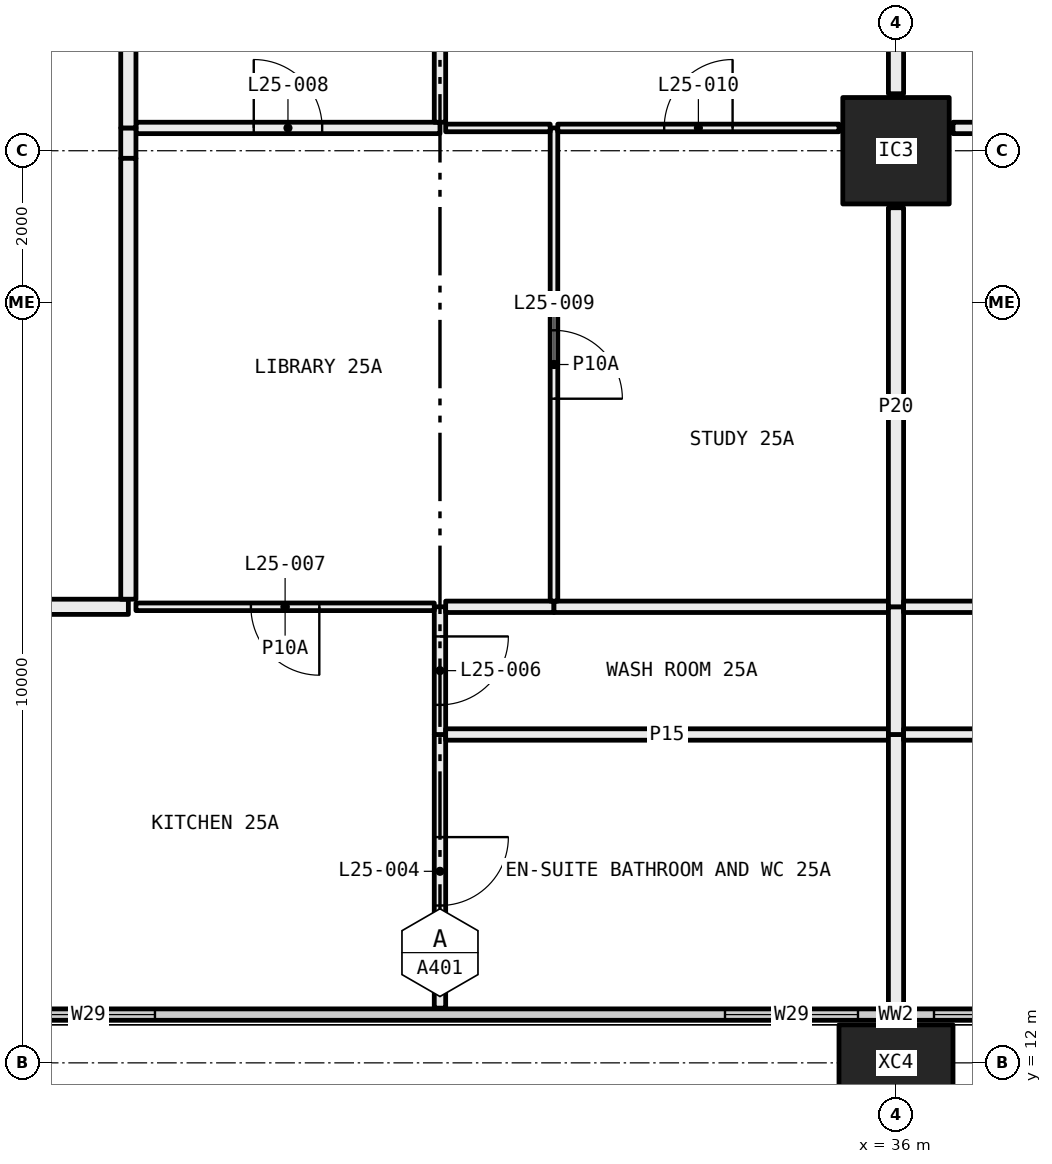
"""IFC4 building model, lengths in metres.
Left out: names, types, materials, properties, quantities, classifications, styles, units other than length and angle.
Written with IfcOpenShell. Run it as: python <this file> out.ifc"""

import sys

from ifc_helpers import new_model, si_unit, direction, frame, frame_2d, origin, origin_2d, place, context, subcontext, project, spatial, rectangle, hollow_rectangle, extrude, element, fill, save


model = new_model("IFC4")
c1 = context("Model", 3, precision=1e-05, world=origin(), true_north=direction((0.0, 1.0)))
c2 = subcontext(c1, "Body", "Model", "MODEL_VIEW")
j1 = project(units=[si_unit("LENGTHUNIT", "METRE"), si_unit("PLANEANGLEUNIT", "RADIAN")], contexts=[c1])
p1 = place(None, origin())
s1 = spatial("IfcSite", under=j1, at=p1, CompositionType="ELEMENT")
p2 = place(p1, origin())
s2 = spatial("IfcBuilding", under=s1, at=p2, CompositionType="ELEMENT")
p3 = place(p2, frame((0.0, 0.0, 100.05)))
s3 = spatial("IfcBuildingStorey", under=s2, at=p3, CompositionType="ELEMENT", Elevation=100.05)
p4 = place(p3, frame((36.0, 12.0, -0.4), z_axis=(0.0, 0.0, 1.0), x_axis=(1.0, 0.0, 0.0)))
e1 = element("IfcColumn", 1, at=p4, inside=s3, PredefinedType="COLUMN", context=c2, shape_type="SweptSolid", body=[
    extrude(hollow_rectangle(XDim=1.5, YDim=1.0, WallThickness=0.06, at=origin_2d()), origin(), (0.0, 0.0, 1.0), 3.45),
])
p5 = place(p3, frame((36.0, 24.0, 0.0), z_axis=(0.0, 0.0, 1.0), x_axis=(1.0, 0.0, 0.0)))
e2 = element("IfcColumn", 2, at=p5, inside=s3, PredefinedType="COLUMN", context=c2, shape_type="SweptSolid", body=[
    extrude(hollow_rectangle(XDim=1.4, YDim=1.4, WallThickness=0.06, at=origin_2d()), origin(), (0.0, 0.0, 1.0), 3.05),
])
p6 = place(p3, frame((6.56, 12.635, 0.0), z_axis=(0.0, 0.0, 1.0), x_axis=(1.0, 0.0, 0.0)))
e3 = element("IfcWall", 3, at=p6, inside=s3, PredefinedType="ELEMENTEDWALL", context=c2, shape_type="SweptSolid", body=[
    extrude(rectangle(XDim=58.88, YDim=0.15, at=frame_2d((29.44, 0.0))), origin(), (0.0, 0.0, 1.0), 3.05),
])
p7 = place(p6, frame((0.44, 0.0, 0.45)))
e4 = element("IfcOpeningElement", 4, at=p7, cuts=e3, PredefinedType="OPENING", context=c2, shape_type="SweptSolid", body=[
    extrude(rectangle(XDim=4.5, YDim=2.55, at=frame_2d((2.25, 1.275))), frame((0.0, 0.085, 0.0), z_axis=(0.0, -1.0, 0.0), x_axis=(1.0, 0.0, 0.0)), (0.0, 0.0, 1.0), 0.17),
])
p8 = place(p6, frame((5.94, 0.0, 0.45)))
e5 = element("IfcOpeningElement", 5, at=p8, cuts=e3, PredefinedType="OPENING", context=c2, shape_type="SweptSolid", body=[
    extrude(rectangle(XDim=1.75, YDim=2.55, at=frame_2d((0.875, 1.275))), frame((0.0, 0.085, 0.0), z_axis=(0.0, -1.0, 0.0), x_axis=(1.0, 0.0, 0.0)), (0.0, 0.0, 1.0), 0.17),
])
p9 = place(p6, frame((15.19, 0.0, 0.45)))
e6 = element("IfcOpeningElement", 6, at=p9, cuts=e3, PredefinedType="OPENING", context=c2, shape_type="SweptSolid", body=[
    extrude(rectangle(XDim=1.75, YDim=2.55, at=frame_2d((0.875, 1.275))), frame((0.0, 0.085, 0.0), z_axis=(0.0, -1.0, 0.0), x_axis=(1.0, 0.0, 0.0)), (0.0, 0.0, 1.0), 0.17),
])
p10 = place(p6, frame((17.94, 0.0, 0.45)))
e7 = element("IfcOpeningElement", 7, at=p10, cuts=e3, PredefinedType="OPENING", context=c2, shape_type="SweptSolid", body=[
    extrude(rectangle(XDim=1.75, YDim=2.55, at=frame_2d((0.875, 1.275))), frame((0.0, 0.085, 0.0), z_axis=(0.0, -1.0, 0.0), x_axis=(1.0, 0.0, 0.0)), (0.0, 0.0, 1.0), 0.17),
])
p11 = place(p6, frame((27.19, 0.0, 0.45)))
e8 = element("IfcOpeningElement", 8, at=p11, cuts=e3, PredefinedType="OPENING", context=c2, shape_type="SweptSolid", body=[
    extrude(rectangle(XDim=1.75, YDim=2.55, at=frame_2d((0.875, 1.275))), frame((0.0, 0.085, 0.0), z_axis=(0.0, -1.0, 0.0), x_axis=(1.0, 0.0, 0.0)), (0.0, 0.0, 1.0), 0.17),
])
p12 = place(p6, frame((29.94, 0.0, 0.45)))
e9 = element("IfcOpeningElement", 9, at=p12, cuts=e3, PredefinedType="OPENING", context=c2, shape_type="SweptSolid", body=[
    extrude(rectangle(XDim=1.75, YDim=2.55, at=frame_2d((0.875, 1.275))), frame((0.0, 0.085, 0.0), z_axis=(0.0, -1.0, 0.0), x_axis=(1.0, 0.0, 0.0)), (0.0, 0.0, 1.0), 0.17),
])
p13 = place(p6, frame((39.19, 0.0, 0.45)))
e10 = element("IfcOpeningElement", 10, at=p13, cuts=e3, PredefinedType="OPENING", context=c2, shape_type="SweptSolid", body=[
    extrude(rectangle(XDim=1.75, YDim=2.55, at=frame_2d((0.875, 1.275))), frame((0.0, 0.085, 0.0), z_axis=(0.0, -1.0, 0.0), x_axis=(1.0, 0.0, 0.0)), (0.0, 0.0, 1.0), 0.17),
])
p14 = place(p6, frame((41.94, 0.0, 0.45)))
e11 = element("IfcOpeningElement", 11, at=p14, cuts=e3, PredefinedType="OPENING", context=c2, shape_type="SweptSolid", body=[
    extrude(rectangle(XDim=1.75, YDim=2.55, at=frame_2d((0.875, 1.275))), frame((0.0, 0.085, 0.0), z_axis=(0.0, -1.0, 0.0), x_axis=(1.0, 0.0, 0.0)), (0.0, 0.0, 1.0), 0.17),
])
p15 = place(p6, frame((51.19, 0.0, 0.45)))
e12 = element("IfcOpeningElement", 12, at=p15, cuts=e3, PredefinedType="OPENING", context=c2, shape_type="SweptSolid", body=[
    extrude(rectangle(XDim=1.75, YDim=2.55, at=frame_2d((0.875, 1.275))), frame((0.0, 0.085, 0.0), z_axis=(0.0, -1.0, 0.0), x_axis=(1.0, 0.0, 0.0)), (0.0, 0.0, 1.0), 0.17),
])
p16 = place(p6, frame((53.94, 0.0, 0.45)))
e13 = element("IfcOpeningElement", 13, at=p16, cuts=e3, PredefinedType="OPENING", context=c2, shape_type="SweptSolid", body=[
    extrude(rectangle(XDim=4.5, YDim=2.55, at=frame_2d((2.25, 1.275))), frame((0.0, 0.085, 0.0), z_axis=(0.0, -1.0, 0.0), x_axis=(1.0, 0.0, 0.0)), (0.0, 0.0, 1.0), 0.17),
])
p17 = place(p3, frame((30.0, 12.72, 0.0), z_axis=(0.0, 0.0, 1.0), x_axis=(0.0, 1.0, 0.0)))
e14 = element("IfcWall", 14, at=p17, inside=s3, PredefinedType="PARTITIONING", context=c2, shape_type="SweptSolid", body=[
    extrude(rectangle(XDim=3.6, YDim=0.15, at=frame_2d((1.8, 0.0))), origin(), (0.0, 0.0, 1.0), 3.05),
])
p18 = place(p17, frame((1.35, 0.0, 0.0)))
e15 = element("IfcOpeningElement", 15, at=p18, cuts=e14, PredefinedType="OPENING", context=c2, shape_type="SweptSolid", body=[
    extrude(rectangle(XDim=0.9, YDim=2.1, at=frame_2d((0.45, 1.05))), frame((0.0, 0.085, 0.0), z_axis=(0.0, -1.0, 0.0), x_axis=(1.0, 0.0, 0.0)), (0.0, 0.0, 1.0), 0.17),
])
p19 = place(p3, frame((30.0, 16.32, 0.0), z_axis=(0.0, 0.0, 1.0), x_axis=(0.0, 1.0, 0.0)))
e16 = element("IfcWall", 16, at=p19, inside=s3, PredefinedType="PARTITIONING", context=c2, shape_type="SweptSolid", body=[
    extrude(rectangle(XDim=1.68, YDim=0.15, at=frame_2d((0.84, 0.0))), origin(), (0.0, 0.0, 1.0), 3.05),
])
p20 = place(p19, frame((0.39, 0.0, 0.0)))
e17 = element("IfcOpeningElement", 17, at=p20, cuts=e16, PredefinedType="OPENING", context=c2, shape_type="SweptSolid", body=[
    extrude(rectangle(XDim=0.9, YDim=2.1, at=frame_2d((0.45, 1.05))), frame((0.0, 0.085, 0.0), z_axis=(0.0, -1.0, 0.0), x_axis=(1.0, 0.0, 0.0)), (0.0, 0.0, 1.0), 0.17),
])
p21 = place(p3, frame((29.925, 18.0, 0.0), z_axis=(0.0, 0.0, 1.0), x_axis=(-1.0, 0.0, 0.0)))
e18 = element("IfcWall", 18, at=p21, inside=s3, PredefinedType="PARTITIONING", context=c2, shape_type="SweptSolid", body=[
    extrude(rectangle(XDim=3.925, YDim=0.1, at=frame_2d((1.962, 0.0))), origin(), (0.0, 0.0, 1.0), 3.05),
])
p22 = place(p21, frame((1.512, 0.0, 0.0)))
e19 = element("IfcOpeningElement", 19, at=p22, cuts=e18, PredefinedType="OPENING", context=c2, shape_type="SweptSolid", body=[
    extrude(rectangle(XDim=0.9, YDim=2.1, at=frame_2d((0.45, 1.05))), frame((0.0, 0.06, 0.0), z_axis=(0.0, -1.0, 0.0), x_axis=(1.0, 0.0, 0.0)), (0.0, 0.0, 1.0), 0.12),
])
p23 = place(p3, frame((25.9, 18.0, 0.0), z_axis=(0.0, 0.0, 1.0), x_axis=(-1.0, 0.0, 0.0)))
e20 = element("IfcWall", 20, at=p23, inside=s3, PredefinedType="PARTITIONING", context=c2, shape_type="SweptSolid", body=[
    extrude(rectangle(XDim=1.9, YDim=0.2, at=frame_2d((0.95, 0.0))), origin(), (0.0, 0.0, 1.0), 3.05),
])
p24 = place(p3, frame((35.9, 16.32, 0.0), z_axis=(0.0, 0.0, 1.0), x_axis=(-1.0, 0.0, 0.0)))
e21 = element("IfcWall", 21, at=p24, inside=s3, PredefinedType="PARTITIONING", context=c2, shape_type="SweptSolid", body=[
    extrude(rectangle(XDim=5.825, YDim=0.15, at=frame_2d((2.913, 0.0))), origin(), (0.0, 0.0, 1.0), 3.05),
])
p25 = place(p3, frame((36.0, 12.72, 0.0), z_axis=(0.0, 0.0, 1.0), x_axis=(0.0, 1.0, 0.0)))
e22 = element("IfcWall", 22, at=p25, inside=s3, PredefinedType="PARTITIONING", context=c2, shape_type="SweptSolid", body=[
    extrude(rectangle(XDim=3.6, YDim=0.2, at=frame_2d((1.8, 0.0))), origin(), (0.0, 0.0, 1.0), 2.45),
])
p26 = place(p3, frame((31.5, 18.0, 0.0), z_axis=(0.0, 0.0, 1.0), x_axis=(-1.0, 0.0, 0.0)))
e23 = element("IfcWall", 23, at=p26, inside=s3, PredefinedType="PARTITIONING", context=c2, shape_type="SweptSolid", body=[
    extrude(rectangle(XDim=1.425, YDim=0.15, at=frame_2d((0.712, 0.0))), origin(), (0.0, 0.0, 1.0), 3.05),
])
p27 = place(p3, frame((35.9, 18.0, 0.0), z_axis=(0.0, 0.0, 1.0), x_axis=(-1.0, 0.0, 0.0)))
e24 = element("IfcWall", 24, at=p27, inside=s3, PredefinedType="PARTITIONING", context=c2, shape_type="SweptSolid", body=[
    extrude(rectangle(XDim=4.4, YDim=0.15, at=frame_2d((2.2, 0.0))), origin(), (0.0, 0.0, 1.0), 3.05),
])
p28 = place(p3, frame((36.0, 16.32, 0.0), z_axis=(0.0, 0.0, 1.0), x_axis=(0.0, 1.0, 0.0)))
e25 = element("IfcWall", 25, at=p28, inside=s3, PredefinedType="PARTITIONING", context=c2, shape_type="SweptSolid", body=[
    extrude(rectangle(XDim=1.68, YDim=0.2, at=frame_2d((0.84, 0.0))), origin(), (0.0, 0.0, 1.0), 2.45),
])
p29 = place(p3, frame((31.5, 18.075, 0.0), z_axis=(0.0, 0.0, 1.0), x_axis=(0.0, 1.0, 0.0)))
e26 = element("IfcWall", 26, at=p29, inside=s3, PredefinedType="PARTITIONING", context=c2, shape_type="SweptSolid", body=[
    extrude(rectangle(XDim=6.225, YDim=0.1, at=frame_2d((3.113, 0.0))), origin(), (0.0, 0.0, 1.0), 2.45),
])
p30 = place(p29, frame((2.663, 0.0, 0.0)))
e27 = element("IfcOpeningElement", 27, at=p30, cuts=e26, PredefinedType="OPENING", context=c2, shape_type="SweptSolid", body=[
    extrude(rectangle(XDim=0.9, YDim=2.1, at=frame_2d((0.45, 1.05))), frame((0.0, 0.06, 0.0), z_axis=(0.0, -1.0, 0.0), x_axis=(1.0, 0.0, 0.0)), (0.0, 0.0, 1.0), 0.12),
])
p31 = place(p3, frame((30.0, 24.3, 0.0), z_axis=(0.0, 0.0, 1.0), x_axis=(-1.0, 0.0, 0.0)))
e28 = element("IfcWall", 28, at=p31, inside=s3, PredefinedType="PARTITIONING", context=c2, shape_type="SweptSolid", body=[
    extrude(rectangle(XDim=4.0, YDim=0.15, at=frame_2d((2.0, 0.0))), origin(), (0.0, 0.0, 1.0), 3.05),
])
p32 = place(p31, frame((1.55, 0.0, 0.0)))
e29 = element("IfcOpeningElement", 29, at=p32, cuts=e28, PredefinedType="OPENING", context=c2, shape_type="SweptSolid", body=[
    extrude(rectangle(XDim=0.9, YDim=2.1, at=frame_2d((0.45, 1.05))), frame((0.0, 0.085, 0.0), z_axis=(0.0, -1.0, 0.0), x_axis=(1.0, 0.0, 0.0)), (0.0, 0.0, 1.0), 0.17),
])
p33 = place(p3, frame((31.45, 24.3, 0.0), z_axis=(0.0, 0.0, 1.0), x_axis=(-1.0, 0.0, 0.0)))
e30 = element("IfcWall", 30, at=p33, inside=s3, PredefinedType="PARTITIONING", context=c2, shape_type="SweptSolid", body=[
    extrude(rectangle(XDim=1.375, YDim=0.1, at=frame_2d((0.688, 0.0))), origin(), (0.0, 0.0, 1.0), 3.05),
])
p34 = place(p3, frame((25.9, 24.3, 0.0), z_axis=(0.0, 0.0, 1.0), x_axis=(0.0, -1.0, 0.0)))
e31 = element("IfcWall", 31, at=p34, inside=s3, PredefinedType="PARTITIONING", context=c2, shape_type="SweptSolid", body=[
    extrude(rectangle(XDim=0.4, YDim=0.2, at=frame_2d((0.2, 0.0))), origin(), (0.0, 0.0, 1.0), 2.45),
])
p35 = place(p3, frame((25.9, 23.9, 0.0), z_axis=(0.0, 0.0, 1.0), x_axis=(0.0, -1.0, 0.0)))
e32 = element("IfcWall", 32, at=p35, inside=s3, PredefinedType="PARTITIONING", context=c2, shape_type="SweptSolid", body=[
    extrude(rectangle(XDim=5.8, YDim=0.2, at=frame_2d((2.9, 0.0))), origin(), (0.0, 0.0, 1.0), 3.05),
])
p36 = place(p3, frame((35.25, 24.3, 0.0), z_axis=(0.0, 0.0, 1.0), x_axis=(-1.0, 0.0, 0.0)))
e33 = element("IfcWall", 33, at=p36, inside=s3, PredefinedType="PARTITIONING", context=c2, shape_type="SweptSolid", body=[
    extrude(rectangle(XDim=3.7, YDim=0.1, at=frame_2d((1.85, 0.0))), origin(), (0.0, 0.0, 1.0), 3.05),
])
p37 = place(p36, frame((1.4, 0.0, 0.0)))
e34 = element("IfcOpeningElement", 34, at=p37, cuts=e33, PredefinedType="OPENING", context=c2, shape_type="SweptSolid", body=[
    extrude(rectangle(XDim=0.9, YDim=2.1, at=frame_2d((0.45, 1.05))), frame((0.0, 0.06, 0.0), z_axis=(0.0, -1.0, 0.0), x_axis=(1.0, 0.0, 0.0)), (0.0, 0.0, 1.0), 0.12),
])
p38 = place(p3, frame((36.0, 18.0, 0.0), z_axis=(0.0, 0.0, 1.0), x_axis=(0.0, 1.0, 0.0)))
e35 = element("IfcWall", 35, at=p38, inside=s3, PredefinedType="PARTITIONING", context=c2, shape_type="SweptSolid", body=[
    extrude(rectangle(XDim=5.25, YDim=0.2, at=frame_2d((2.625, 0.0))), origin(), (0.0, 0.0, 1.0), 2.45),
])
p39 = place(p3, frame((30.0, 24.375, 0.0), z_axis=(0.0, 0.0, 1.0), x_axis=(0.0, 1.0, 0.0)))
e36 = element("IfcWall", 36, at=p39, inside=s3, PredefinedType="PARTITIONING", context=c2, shape_type="SweptSolid", body=[
    extrude(rectangle(XDim=4.325, YDim=0.15, at=frame_2d((2.163, 0.0))), origin(), (0.0, 0.0, 1.0), 3.05),
])
p40 = place(p3, frame((25.9, 28.7, 0.0), z_axis=(0.0, 0.0, 1.0), x_axis=(0.0, -1.0, 0.0)))
e37 = element("IfcWall", 37, at=p40, inside=s3, PredefinedType="PARTITIONING", context=c2, shape_type="SweptSolid", body=[
    extrude(rectangle(XDim=4.4, YDim=0.2, at=frame_2d((2.2, 0.0))), origin(), (0.0, 0.0, 1.0), 3.05),
])
p41 = place(p3, frame((36.0, 24.75, 0.0), z_axis=(0.0, 0.0, 1.0), x_axis=(0.0, 1.0, 0.0)))
e38 = element("IfcWall", 38, at=p41, inside=s3, PredefinedType="PARTITIONING", context=c2, shape_type="SweptSolid", body=[
    extrude(rectangle(XDim=1.8, YDim=0.2, at=frame_2d((0.9, 0.0))), origin(), (0.0, 0.0, 1.0), 2.45),
])
p42 = place(p3, frame((42.0, 16.32, 0.0), z_axis=(0.0, 0.0, 1.0), x_axis=(-1.0, 0.0, 0.0)))
e39 = element("IfcWall", 39, at=p42, inside=s3, PredefinedType="PARTITIONING", context=c2, shape_type="SweptSolid", body=[
    extrude(rectangle(XDim=5.9, YDim=0.15, at=frame_2d((2.95, 0.0))), origin(), (0.0, 0.0, 1.0), 3.05),
])
p43 = place(p3, frame((40.5, 18.0, 0.0), z_axis=(0.0, 0.0, 1.0), x_axis=(-1.0, 0.0, 0.0)))
e40 = element("IfcWall", 40, at=p43, inside=s3, PredefinedType="PARTITIONING", context=c2, shape_type="SweptSolid", body=[
    extrude(rectangle(XDim=4.4, YDim=0.15, at=frame_2d((2.2, 0.0))), origin(), (0.0, 0.0, 1.0), 3.05),
])
p44 = place(p3, frame((38.4, 24.3, 0.0), z_axis=(0.0, 0.0, 1.0), x_axis=(-1.0, 0.0, 0.0)))
e41 = element("IfcWall", 41, at=p44, inside=s3, PredefinedType="PARTITIONING", context=c2, shape_type="SweptSolid", body=[
    extrude(rectangle(XDim=1.65, YDim=0.15, at=frame_2d((0.825, 0.0))), origin(), (0.0, 0.0, 1.0), 3.05),
])
p45 = place(p44, frame((0.375, 0.0, 0.0)))
e42 = element("IfcOpeningElement", 42, at=p45, cuts=e41, PredefinedType="OPENING", context=c2, shape_type="SweptSolid", body=[
    extrude(rectangle(XDim=0.9, YDim=2.1, at=frame_2d((0.45, 1.05))), frame((0.0, 0.085, 0.0), z_axis=(0.0, -1.0, 0.0), x_axis=(1.0, 0.0, 0.0)), (0.0, 0.0, 1.0), 0.17),
])
p46 = place(p10, origin())
e43 = element("IfcWindow", 43, at=p46, inside=s3, PartitioningType="SINGLE_PANEL", PredefinedType="WINDOW", context=c2, shape_type="SweptSolid", body=[
    extrude(rectangle(XDim=1.75, YDim=2.55, at=frame_2d((0.875, 1.275))), frame((0.0, 0.03, 0.0), z_axis=(0.0, -1.0, 0.0), x_axis=(1.0, 0.0, 0.0)), (0.0, 0.0, 1.0), 0.06),
])
fill(e7, e43)
p47 = place(p11, origin())
e44 = element("IfcWindow", 44, at=p47, inside=s3, PartitioningType="SINGLE_PANEL", PredefinedType="WINDOW", context=c2, shape_type="SweptSolid", body=[
    extrude(rectangle(XDim=1.75, YDim=2.55, at=frame_2d((0.875, 1.275))), frame((0.0, 0.03, 0.0), z_axis=(0.0, -1.0, 0.0), x_axis=(1.0, 0.0, 0.0)), (0.0, 0.0, 1.0), 0.06),
])
fill(e8, e44)
p48 = place(p12, origin())
e45 = element("IfcWindow", 45, at=p48, inside=s3, PartitioningType="SINGLE_PANEL", PredefinedType="WINDOW", context=c2, shape_type="SweptSolid", body=[
    extrude(rectangle(XDim=1.75, YDim=2.55, at=frame_2d((0.875, 1.275))), frame((0.0, 0.03, 0.0), z_axis=(0.0, -1.0, 0.0), x_axis=(1.0, 0.0, 0.0)), (0.0, 0.0, 1.0), 0.06),
])
fill(e9, e45)
p49 = place(p18, frame((0.9, 0.0, 0.0), x_axis=(-1.0, 0.0, 0.0)))
e46 = element("IfcDoor", 46, at=p49, inside=s3, OperationType="SINGLE_SWING_RIGHT", PredefinedType="DOOR", context=c2, shape_type="SweptSolid", body=[
    extrude(rectangle(XDim=0.9, YDim=2.1, at=frame_2d((0.45, 1.05))), frame((0.0, 0.025, 0.0), z_axis=(0.0, -1.0, 0.0), x_axis=(1.0, 0.0, 0.0)), (0.0, 0.0, 1.0), 0.05),
])
fill(e15, e46)
p50 = place(p20, frame((0.9, 0.0, 0.0), x_axis=(-1.0, 0.0, 0.0)))
e47 = element("IfcDoor", 47, at=p50, inside=s3, OperationType="SINGLE_SWING_RIGHT", PredefinedType="DOOR", context=c2, shape_type="SweptSolid", body=[
    extrude(rectangle(XDim=0.9, YDim=2.1, at=frame_2d((0.45, 1.05))), frame((0.0, 0.025, 0.0), z_axis=(0.0, -1.0, 0.0), x_axis=(1.0, 0.0, 0.0)), (0.0, 0.0, 1.0), 0.05),
])
fill(e17, e47)
p51 = place(p22, origin())
e48 = element("IfcDoor", 48, at=p51, inside=s3, OperationType="SINGLE_SWING_RIGHT", PredefinedType="DOOR", context=c2, shape_type="SweptSolid", body=[
    extrude(rectangle(XDim=0.9, YDim=2.1, at=frame_2d((0.45, 1.05))), frame((0.0, 0.025, 0.0), z_axis=(0.0, -1.0, 0.0), x_axis=(1.0, 0.0, 0.0)), (0.0, 0.0, 1.0), 0.05),
])
fill(e19, e48)
p52 = place(p32, frame((0.9, 0.0, 0.0), x_axis=(-1.0, 0.0, 0.0)))
e49 = element("IfcDoor", 49, at=p52, inside=s3, OperationType="SINGLE_SWING_RIGHT", PredefinedType="DOOR", context=c2, shape_type="SweptSolid", body=[
    extrude(rectangle(XDim=0.9, YDim=2.1, at=frame_2d((0.45, 1.05))), frame((0.0, 0.025, 0.0), z_axis=(0.0, -1.0, 0.0), x_axis=(1.0, 0.0, 0.0)), (0.0, 0.0, 1.0), 0.05),
])
fill(e29, e49)
p53 = place(p30, frame((0.9, 0.0, 0.0), x_axis=(-1.0, 0.0, 0.0)))
e50 = element("IfcDoor", 50, at=p53, inside=s3, OperationType="SINGLE_SWING_LEFT", PredefinedType="DOOR", context=c2, shape_type="SweptSolid", body=[
    extrude(rectangle(XDim=0.9, YDim=2.1, at=frame_2d((0.45, 1.05))), frame((0.0, 0.025, 0.0), z_axis=(0.0, -1.0, 0.0), x_axis=(1.0, 0.0, 0.0)), (0.0, 0.0, 1.0), 0.05),
])
fill(e27, e50)
p54 = place(p37, frame((0.9, 0.0, 0.0), x_axis=(-1.0, 0.0, 0.0)))
e51 = element("IfcDoor", 51, at=p54, inside=s3, OperationType="SINGLE_SWING_LEFT", PredefinedType="DOOR", context=c2, shape_type="SweptSolid", body=[
    extrude(rectangle(XDim=0.9, YDim=2.1, at=frame_2d((0.45, 1.05))), frame((0.0, 0.025, 0.0), z_axis=(0.0, -1.0, 0.0), x_axis=(1.0, 0.0, 0.0)), (0.0, 0.0, 1.0), 0.05),
])
fill(e34, e51)
save(model, sys.argv[1])
